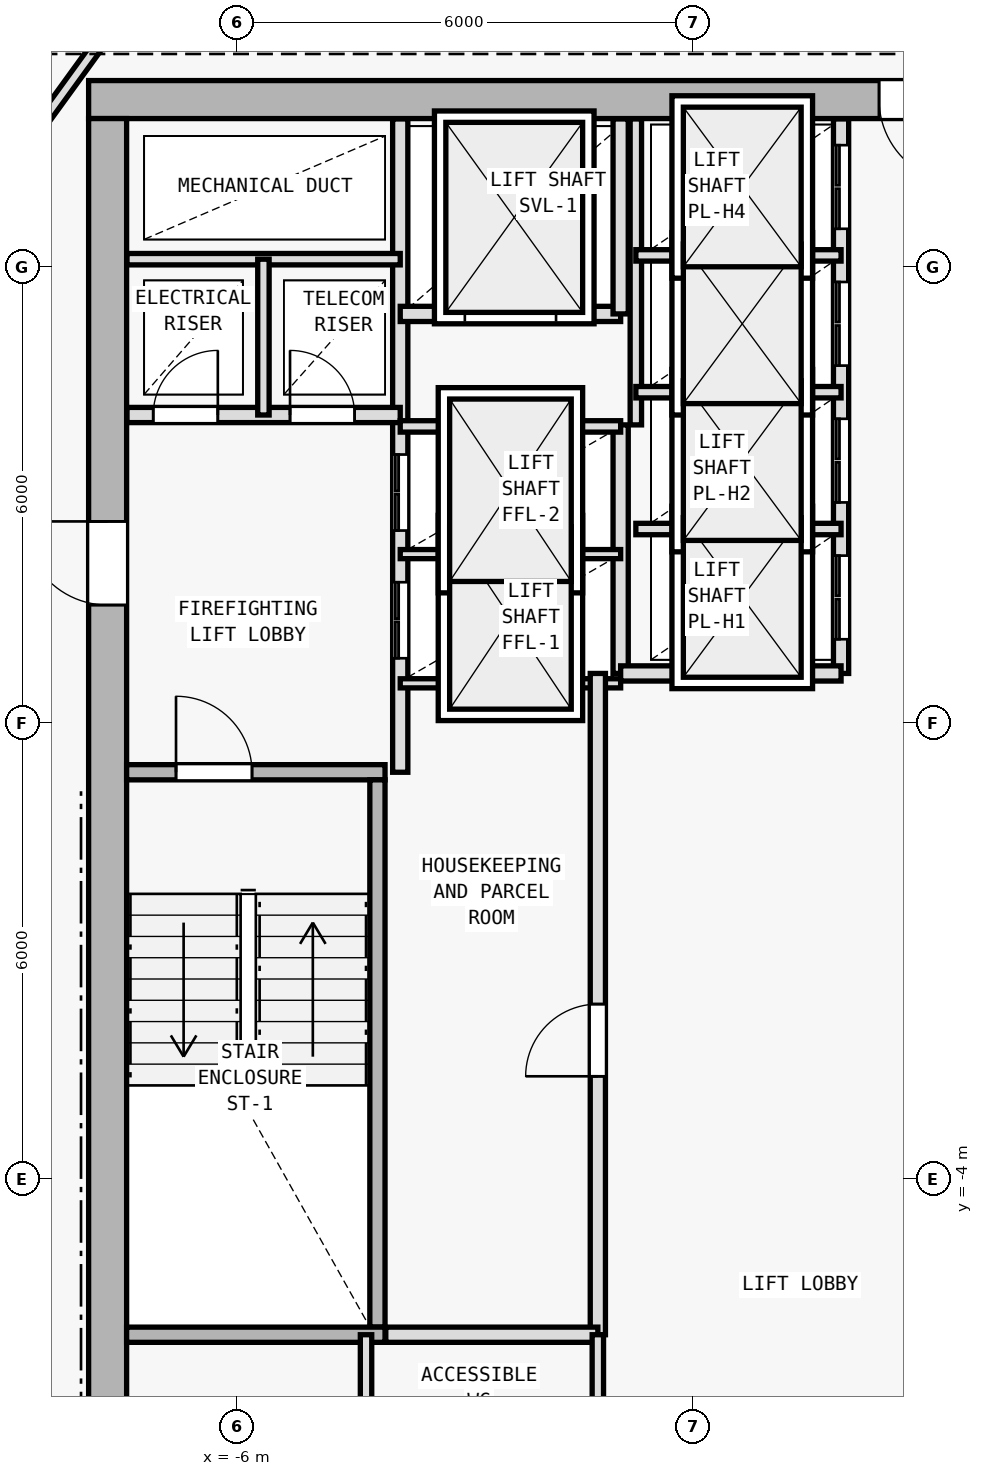
"""IFC4 building model, lengths in metres.
Left out: names, types, materials, properties, quantities, classifications, styles, units other than length and angle.
Written with IfcOpenShell. Run it as: python <this file> out.ifc"""

import sys

from ifc_helpers import new_model, si_unit, direction, frame, frame_2d, origin, origin_2d, place, context, subcontext, project, spatial, rectangle, i_section, extrude, element, fill, save


model = new_model("IFC4")
c1 = context("Model", 3, precision=1e-05, world=origin(), true_north=direction((0.0, 1.0)))
c2 = subcontext(c1, "Body", "Model", "MODEL_VIEW")
j1 = project(units=[si_unit("LENGTHUNIT", "METRE"), si_unit("PLANEANGLEUNIT", "RADIAN")], contexts=[c1])
p1 = place(None, origin())
s1 = spatial("IfcSite", under=j1, at=p1, CompositionType="ELEMENT")
p2 = place(p1, origin())
s2 = spatial("IfcBuilding", under=s1, at=p2, CompositionType="ELEMENT")
p3 = place(p2, frame((0.0, 0.0, 227.1)))
s3 = spatial("IfcBuildingStorey", under=s2, at=p3, CompositionType="ELEMENT", Elevation=227.1)
for number, where, z_axis, x_axis in (
    (1, (-7.7, 10.2, 0.0), (0.0, 0.0, 1.0), (1.0, 0.0, 0.0)),
    (2, (-7.7, 2.0, 0.0), (0.0, 0.0, 1.0), (1.0, 0.0, 0.0)),
):
    element("IfcColumn", number, at=place(p3, frame(where, z_axis=z_axis, x_axis=x_axis)), inside=s3, PredefinedType="COLUMN", context=c2, shape_type="SweptSolid", body=[
        extrude(i_section(OverallWidth=0.398, OverallDepth=0.387, WebThickness=0.013, FlangeThickness=0.022, FilletRadius=0.015, at=origin_2d()), origin(), (0.0, 0.0, 1.0), 3.6),
    ])
p4 = place(p3, frame((7.95, 10.2, 0.0), z_axis=(0.0, 0.0, 1.0), x_axis=(-1.0, 0.0, 0.0)))
e3 = element("IfcWall", 3, at=p4, inside=s3, PredefinedType="SHEAR", context=c2, shape_type="SweptSolid", body=[
    extrude(rectangle(XDim=15.9, YDim=0.5, at=frame_2d((7.95, 0.0))), origin(), (0.0, 0.0, 1.0), 3.35),
])
p5 = place(p4, frame((4.4, 0.0, 0.0)))
e4 = element("IfcOpeningElement", 4, at=p5, cuts=e3, PredefinedType="OPENING", context=c2, shape_type="SweptSolid", body=[
    extrude(rectangle(XDim=1.1, YDim=2.15, at=frame_2d((0.55, 1.075))), frame((0.0, 0.26, 0.0), z_axis=(0.0, -1.0, 0.0), x_axis=(1.0, 0.0, 0.0)), (0.0, 0.0, 1.0), 0.52),
])
p6 = place(p3, frame((-7.7, -9.15, 0.0), z_axis=(0.0, 0.0, 1.0), x_axis=(0.0, 1.0, 0.0)))
e5 = element("IfcWall", 5, at=p6, inside=s3, PredefinedType="SHEAR", context=c2, shape_type="SweptSolid", body=[
    extrude(rectangle(XDim=19.1, YDim=0.5, at=frame_2d((9.55, 0.0))), origin(), (0.0, 0.0, 1.0), 3.35),
])
p7 = place(p6, frame((12.7, 0.0, 0.0)))
e6 = element("IfcOpeningElement", 6, at=p7, cuts=e5, PredefinedType="OPENING", context=c2, shape_type="SweptSolid", body=[
    extrude(rectangle(XDim=1.1, YDim=2.15, at=frame_2d((0.55, 1.075))), frame((0.0, 0.26, 0.0), z_axis=(0.0, -1.0, 0.0), x_axis=(1.0, 0.0, 0.0)), (0.0, 0.0, 1.0), 0.52),
])
p8 = place(p3, frame((-7.45, 1.35, 0.0), z_axis=(0.0, 0.0, 1.0), x_axis=(1.0, 0.0, 0.0)))
e7 = element("IfcWall", 7, at=p8, inside=s3, PredefinedType="SOLIDWALL", context=c2, shape_type="SweptSolid", body=[
    extrude(rectangle(XDim=3.4, YDim=0.2, at=frame_2d((1.7, 0.0))), origin(), (0.0, 0.0, 1.0), 3.35),
])
p9 = place(p8, frame((0.65, 0.0, 0.0)))
e8 = element("IfcOpeningElement", 8, at=p9, cuts=e7, PredefinedType="OPENING", context=c2, shape_type="SweptSolid", body=[
    extrude(rectangle(XDim=1.0, YDim=2.15, at=frame_2d((0.5, 1.075))), frame((0.0, 0.11, 0.0), z_axis=(0.0, -1.0, 0.0), x_axis=(1.0, 0.0, 0.0)), (0.0, 0.0, 1.0), 0.22),
])
p10 = place(p3, frame((-4.15, -5.95, 0.0), z_axis=(0.0, 0.0, 1.0), x_axis=(0.0, 1.0, 0.0)))
e9 = element("IfcWall", 9, at=p10, inside=s3, PredefinedType="SOLIDWALL", context=c2, shape_type="SweptSolid", body=[
    extrude(rectangle(XDim=7.2, YDim=0.2, at=frame_2d((3.6, 0.0))), origin(), (0.0, 0.0, 1.0), 3.35),
])
p11 = place(p3, frame((-3.85, 1.35, 0.0), z_axis=(0.0, 0.0, 1.0), x_axis=(0.0, 1.0, 0.0)))
e10 = element("IfcWall", 10, at=p11, inside=s3, PredefinedType="SOLIDWALL", context=c2, shape_type="SweptSolid", body=[
    extrude(rectangle(XDim=8.595, YDim=0.2, at=frame_2d((4.297, 0.0))), origin(), (0.0, 0.0, 1.0), 3.35),
])
p12 = place(p11, frame((1.5, 0.0, 0.0)))
e11 = element("IfcOpeningElement", 11, at=p12, cuts=e10, PredefinedType="OPENING", context=c2, shape_type="SweptSolid", body=[
    extrude(rectangle(XDim=1.0, YDim=2.15, at=frame_2d((0.5, 1.075))), frame((0.0, 0.11, 0.0), z_axis=(0.0, -1.0, 0.0), x_axis=(1.0, 0.0, 0.0)), (0.0, 0.0, 1.0), 0.22),
])
p13 = place(p11, frame((3.18, 0.0, 0.0)))
e12 = element("IfcOpeningElement", 12, at=p13, cuts=e10, PredefinedType="OPENING", context=c2, shape_type="SweptSolid", body=[
    extrude(rectangle(XDim=1.0, YDim=2.15, at=frame_2d((0.5, 1.075))), frame((0.0, 0.11, 0.0), z_axis=(0.0, -1.0, 0.0), x_axis=(1.0, 0.0, 0.0)), (0.0, 0.0, 1.0), 0.22),
])
p14 = place(p3, frame((-7.445, 6.05, 0.0), z_axis=(0.0, 0.0, 1.0), x_axis=(1.0, 0.0, 0.0)))
e13 = element("IfcWall", 13, at=p14, inside=s3, PredefinedType="SOLIDWALL", context=c2, shape_type="SweptSolid", body=[
    extrude(rectangle(XDim=3.595, YDim=0.2, at=frame_2d((1.797, 0.0))), origin(), (0.0, 0.0, 1.0), 3.35),
])
p15 = place(p14, frame((0.345, 0.0, 0.0)))
e14 = element("IfcOpeningElement", 14, at=p15, cuts=e13, PredefinedType="OPENING", context=c2, shape_type="SweptSolid", body=[
    extrude(rectangle(XDim=0.85, YDim=2.1, at=frame_2d((0.425, 1.05))), frame((0.0, 0.11, 0.0), z_axis=(0.0, -1.0, 0.0), x_axis=(1.0, 0.0, 0.0)), (0.0, 0.0, 1.0), 0.22),
])
p16 = place(p14, frame((2.145, 0.0, 0.0)))
e15 = element("IfcOpeningElement", 15, at=p16, cuts=e13, PredefinedType="OPENING", context=c2, shape_type="SweptSolid", body=[
    extrude(rectangle(XDim=0.85, YDim=2.1, at=frame_2d((0.425, 1.05))), frame((0.0, 0.11, 0.0), z_axis=(0.0, -1.0, 0.0), x_axis=(1.0, 0.0, 0.0)), (0.0, 0.0, 1.0), 0.22),
])
p17 = place(p3, frame((-7.445, 8.1, 0.0), z_axis=(0.0, 0.0, 1.0), x_axis=(1.0, 0.0, 0.0)))
e16 = element("IfcWall", 16, at=p17, inside=s3, PredefinedType="PARTITIONING", context=c2, shape_type="SweptSolid", body=[
    extrude(rectangle(XDim=3.595, YDim=0.15, at=frame_2d((1.797, 0.0))), origin(), (0.0, 0.0, 1.0), 3.35),
])
p18 = place(p3, frame((-5.65, 6.05, 0.0), z_axis=(0.0, 0.0, 1.0), x_axis=(0.0, 1.0, 0.0)))
e17 = element("IfcWall", 17, at=p18, inside=s3, PredefinedType="PARTITIONING", context=c2, shape_type="SweptSolid", body=[
    extrude(rectangle(XDim=2.05, YDim=0.15, at=frame_2d((1.025, 0.0))), origin(), (0.0, 0.0, 1.0), 3.35),
])
p19 = place(p3, frame((-0.95, 2.65, 0.0), z_axis=(0.0, 0.0, 1.0), x_axis=(0.0, 1.0, 0.0)))
e18 = element("IfcWall", 18, at=p19, inside=s3, PredefinedType="SOLIDWALL", context=c2, shape_type="SweptSolid", body=[
    extrude(rectangle(XDim=3.27, YDim=0.2, at=frame_2d((1.635, 0.0))), origin(), (0.0, 0.0, 1.0), 3.35),
])
for number, where, z_axis, x_axis in (
    (19, (-3.85, 2.52, 0.0), (0.0, 0.0, 1.0), (1.0, 0.0, 0.0)),
    (20, (-3.85, 4.22, 0.0), (0.0, 0.0, 1.0), (1.0, 0.0, 0.0)),
):
    element("IfcWall", number, at=place(p3, frame(where, z_axis=z_axis, x_axis=x_axis)), inside=s3, PredefinedType="PARTITIONING", context=c2, shape_type="SweptSolid", body=[
        extrude(rectangle(XDim=2.9, YDim=0.12, at=frame_2d((1.45, 0.0))), origin(), (0.0, 0.0, 1.0), 3.35),
    ])
p20 = place(p3, frame((-3.85, 5.9, 0.0), z_axis=(0.0, 0.0, 1.0), x_axis=(1.0, 0.0, 0.0)))
e21 = element("IfcWall", 21, at=p20, inside=s3, PredefinedType="PARTITIONING", context=c2, shape_type="SweptSolid", body=[
    extrude(rectangle(XDim=2.9, YDim=0.15, at=frame_2d((1.45, 0.0))), origin(), (0.0, 0.0, 1.0), 3.35),
])
p21 = place(p3, frame((-3.85, 7.38, 0.0), z_axis=(0.0, 0.0, 1.0), x_axis=(1.0, 0.0, 0.0)))
e22 = element("IfcWall", 22, at=p21, inside=s3, PredefinedType="SOLIDWALL", context=c2, shape_type="SweptSolid", body=[
    extrude(rectangle(XDim=2.9, YDim=0.2, at=frame_2d((1.45, 0.0))), origin(), (0.0, 0.0, 1.0), 3.35),
])
p22 = place(p21, frame((0.85, 0.0, 0.0)))
e23 = element("IfcOpeningElement", 23, at=p22, cuts=e22, PredefinedType="OPENING", context=c2, shape_type="SweptSolid", body=[
    extrude(rectangle(XDim=1.2, YDim=2.2, at=frame_2d((0.6, 1.1))), frame((0.0, 0.11, 0.0), z_axis=(0.0, -1.0, 0.0), x_axis=(1.0, 0.0, 0.0)), (0.0, 0.0, 1.0), 0.22),
])
p23 = place(p3, frame((-0.95, 7.38, 0.0), z_axis=(0.0, 0.0, 1.0), x_axis=(0.0, 1.0, 0.0)))
e24 = element("IfcWall", 24, at=p23, inside=s3, PredefinedType="SOLIDWALL", context=c2, shape_type="SweptSolid", body=[
    extrude(rectangle(XDim=2.565, YDim=0.2, at=frame_2d((1.283, 0.0))), origin(), (0.0, 0.0, 1.0), 3.35),
])
p24 = place(p3, frame((-1.25, -6.05, 0.0), z_axis=(0.0, 0.0, 1.0), x_axis=(0.0, 1.0, 0.0)))
e25 = element("IfcWall", 25, at=p24, inside=s3, PredefinedType="SOLIDWALL", context=c2, shape_type="SweptSolid", body=[
    extrude(rectangle(XDim=8.7, YDim=0.2, at=frame_2d((4.35, 0.0))), origin(), (0.0, 0.0, 1.0), 3.35),
])
p25 = place(p24, frame((3.4, 0.0, 0.0)))
e26 = element("IfcOpeningElement", 26, at=p25, cuts=e25, PredefinedType="OPENING", context=c2, shape_type="SweptSolid", body=[
    extrude(rectangle(XDim=0.95, YDim=2.1, at=frame_2d((0.475, 1.05))), frame((0.0, 0.11, 0.0), z_axis=(0.0, -1.0, 0.0), x_axis=(1.0, 0.0, 0.0)), (0.0, 0.0, 1.0), 0.22),
])
p26 = place(p3, frame((1.95, 2.65, 0.0), z_axis=(0.0, 0.0, 1.0), x_axis=(0.0, 1.0, 0.0)))
e27 = element("IfcWall", 27, at=p26, inside=s3, PredefinedType="SOLIDWALL", context=c2, shape_type="SweptSolid", body=[
    extrude(rectangle(XDim=7.295, YDim=0.2, at=frame_2d((3.647, 0.0))), origin(), (0.0, 0.0, 1.0), 3.35),
])
p27 = place(p26, frame((0.45, 0.0, 0.0)))
e28 = element("IfcOpeningElement", 28, at=p27, cuts=e27, PredefinedType="OPENING", context=c2, shape_type="SweptSolid", body=[
    extrude(rectangle(XDim=1.1, YDim=2.15, at=frame_2d((0.55, 1.075))), frame((0.0, 0.11, 0.0), z_axis=(0.0, -1.0, 0.0), x_axis=(1.0, 0.0, 0.0)), (0.0, 0.0, 1.0), 0.22),
])
p28 = place(p26, frame((2.25, 0.0, 0.0)))
e29 = element("IfcOpeningElement", 29, at=p28, cuts=e27, PredefinedType="OPENING", context=c2, shape_type="SweptSolid", body=[
    extrude(rectangle(XDim=1.1, YDim=2.15, at=frame_2d((0.55, 1.075))), frame((0.0, 0.11, 0.0), z_axis=(0.0, -1.0, 0.0), x_axis=(1.0, 0.0, 0.0)), (0.0, 0.0, 1.0), 0.22),
])
p29 = place(p26, frame((4.05, 0.0, 0.0)))
e30 = element("IfcOpeningElement", 30, at=p29, cuts=e27, PredefinedType="OPENING", context=c2, shape_type="SweptSolid", body=[
    extrude(rectangle(XDim=1.1, YDim=2.15, at=frame_2d((0.55, 1.075))), frame((0.0, 0.11, 0.0), z_axis=(0.0, -1.0, 0.0), x_axis=(1.0, 0.0, 0.0)), (0.0, 0.0, 1.0), 0.22),
])
p30 = place(p26, frame((5.85, 0.0, 0.0)))
e31 = element("IfcOpeningElement", 31, at=p30, cuts=e27, PredefinedType="OPENING", context=c2, shape_type="SweptSolid", body=[
    extrude(rectangle(XDim=1.1, YDim=2.15, at=frame_2d((0.55, 1.075))), frame((0.0, 0.11, 0.0), z_axis=(0.0, -1.0, 0.0), x_axis=(1.0, 0.0, 0.0)), (0.0, 0.0, 1.0), 0.22),
])
p31 = place(p3, frame((-0.95, 2.65, 0.0), z_axis=(0.0, 0.0, 1.0), x_axis=(1.0, 0.0, 0.0)))
e32 = element("IfcWall", 32, at=p31, inside=s3, PredefinedType="SOLIDWALL", context=c2, shape_type="SweptSolid", body=[
    extrude(rectangle(XDim=2.9, YDim=0.2, at=frame_2d((1.45, 0.0))), origin(), (0.0, 0.0, 1.0), 3.35),
])
p32 = place(p3, frame((-0.75, 5.92, 0.0), z_axis=(0.0, 0.0, 1.0), x_axis=(0.0, 1.0, 0.0)))
e33 = element("IfcWall", 33, at=p32, inside=s3, PredefinedType="PARTITIONING", context=c2, shape_type="SweptSolid", body=[
    extrude(rectangle(XDim=4.025, YDim=0.15, at=frame_2d((2.013, 0.0))), origin(), (0.0, 0.0, 1.0), 3.35),
])
for number, where, z_axis, x_axis in (
    (34, (-0.75, 4.55, 0.0), (0.0, 0.0, 1.0), (1.0, 0.0, 0.0)),
    (35, (-0.75, 6.35, 0.0), (0.0, 0.0, 1.0), (1.0, 0.0, 0.0)),
    (36, (-0.75, 8.15, 0.0), (0.0, 0.0, 1.0), (1.0, 0.0, 0.0)),
):
    element("IfcWall", number, at=place(p3, frame(where, z_axis=z_axis, x_axis=x_axis)), inside=s3, PredefinedType="PARTITIONING", context=c2, shape_type="SweptSolid", body=[
        extrude(rectangle(XDim=2.7, YDim=0.15, at=frame_2d((1.35, 0.0))), origin(), (0.0, 0.0, 1.0), 3.35),
    ])
p33 = place(p3, frame((-7.45, -6.05, 0.0), z_axis=(0.0, 0.0, 1.0), x_axis=(1.0, 0.0, 0.0)))
e37 = element("IfcWall", 37, at=p33, inside=s3, PredefinedType="SOLIDWALL", context=c2, shape_type="SweptSolid", body=[
    extrude(rectangle(XDim=3.4, YDim=0.2, at=frame_2d((1.7, 0.0))), origin(), (0.0, 0.0, 1.0), 3.35),
])
p34 = place(p3, frame((-4.04, -6.05, 0.0), z_axis=(0.0, 0.0, 1.0), x_axis=(1.0, 0.0, 0.0)))
e38 = element("IfcWall", 38, at=p34, inside=s3, PredefinedType="SOLIDWALL", context=c2, shape_type="SweptSolid", body=[
    extrude(rectangle(XDim=2.79, YDim=0.2, at=frame_2d((1.395, 0.0))), origin(), (0.0, 0.0, 1.0), 3.35),
])
p35 = place(p3, frame((-1.25, -9.145, 0.0), z_axis=(0.0, 0.0, 1.0), x_axis=(0.0, 1.0, 0.0)))
e39 = element("IfcWall", 39, at=p35, inside=s3, PredefinedType="PARTITIONING", context=c2, shape_type="SweptSolid", body=[
    extrude(rectangle(XDim=3.095, YDim=0.15, at=frame_2d((1.547, 0.0))), origin(), (0.0, 0.0, 1.0), 3.35),
])
p36 = place(p35, frame((0.845, 0.0, 0.0)))
e40 = element("IfcOpeningElement", 40, at=p36, cuts=e39, PredefinedType="OPENING", context=c2, shape_type="SweptSolid", body=[
    extrude(rectangle(XDim=0.95, YDim=2.1, at=frame_2d((0.475, 1.05))), frame((0.0, 0.085, 0.0), z_axis=(0.0, -1.0, 0.0), x_axis=(1.0, 0.0, 0.0)), (0.0, 0.0, 1.0), 0.17),
])
p37 = place(p3, frame((-4.3, -9.145, 0.0), z_axis=(0.0, 0.0, 1.0), x_axis=(0.0, 1.0, 0.0)))
e41 = element("IfcWall", 41, at=p37, inside=s3, PredefinedType="PARTITIONING", context=c2, shape_type="SweptSolid", body=[
    extrude(rectangle(XDim=3.095, YDim=0.15, at=frame_2d((1.547, 0.0))), origin(), (0.0, 0.0, 1.0), 3.35),
])
p38 = place(p37, frame((0.845, 0.0, 0.0)))
e42 = element("IfcOpeningElement", 42, at=p38, cuts=e41, PredefinedType="OPENING", context=c2, shape_type="SweptSolid", body=[
    extrude(rectangle(XDim=0.9, YDim=2.1, at=frame_2d((0.45, 1.05))), frame((0.0, 0.085, 0.0), z_axis=(0.0, -1.0, 0.0), x_axis=(1.0, 0.0, 0.0)), (0.0, 0.0, 1.0), 0.17),
])
p39 = place(p3, frame((-9.78, 8.226, 0.0), z_axis=(0.0, 0.0, 1.0), x_axis=(0.586956386413, 0.809618552436, 0.0)))
e43 = element("IfcWall", 43, at=p39, inside=s3, PredefinedType="PARTITIONING", context=c2, shape_type="SweptSolid", body=[
    extrude(rectangle(XDim=5.008, YDim=0.15, at=frame_2d((2.504, 0.0))), origin(), (0.0, 0.0, 1.0), 2.975),
])
p40 = place(p7, origin())
e44 = element("IfcDoor", 44, at=p40, inside=s3, OperationType="SINGLE_SWING_RIGHT", PredefinedType="DOOR", context=c2, shape_type="SweptSolid", body=[
    extrude(rectangle(XDim=1.1, YDim=2.15, at=frame_2d((0.55, 1.075))), frame((0.0, 0.025, 0.0), z_axis=(0.0, -1.0, 0.0), x_axis=(1.0, 0.0, 0.0)), (0.0, 0.0, 1.0), 0.05),
])
fill(e6, e44)
p41 = place(p5, origin())
e45 = element("IfcDoor", 45, at=p41, inside=s3, OperationType="SINGLE_SWING_LEFT", PredefinedType="DOOR", context=c2, shape_type="SweptSolid", body=[
    extrude(rectangle(XDim=1.1, YDim=2.15, at=frame_2d((0.55, 1.075))), frame((0.0, 0.025, 0.0), z_axis=(0.0, -1.0, 0.0), x_axis=(1.0, 0.0, 0.0)), (0.0, 0.0, 1.0), 0.05),
])
fill(e4, e45)
p42 = place(p9, origin())
e46 = element("IfcDoor", 46, at=p42, inside=s3, OperationType="SINGLE_SWING_LEFT", PredefinedType="DOOR", context=c2, shape_type="SweptSolid", body=[
    extrude(rectangle(XDim=1.0, YDim=2.15, at=frame_2d((0.5, 1.075))), frame((0.0, 0.025, 0.0), z_axis=(0.0, -1.0, 0.0), x_axis=(1.0, 0.0, 0.0)), (0.0, 0.0, 1.0), 0.05),
])
fill(e8, e46)
p43 = place(p15, origin())
e47 = element("IfcDoor", 47, at=p43, inside=s3, OperationType="SINGLE_SWING_RIGHT", PredefinedType="DOOR", context=c2, shape_type="SweptSolid", body=[
    extrude(rectangle(XDim=0.85, YDim=2.1, at=frame_2d((0.425, 1.05))), frame((0.0, 0.025, 0.0), z_axis=(0.0, -1.0, 0.0), x_axis=(1.0, 0.0, 0.0)), (0.0, 0.0, 1.0), 0.05),
])
fill(e14, e47)
p44 = place(p16, origin())
e48 = element("IfcDoor", 48, at=p44, inside=s3, OperationType="SINGLE_SWING_LEFT", PredefinedType="DOOR", context=c2, shape_type="SweptSolid", body=[
    extrude(rectangle(XDim=0.85, YDim=2.1, at=frame_2d((0.425, 1.05))), frame((0.0, 0.025, 0.0), z_axis=(0.0, -1.0, 0.0), x_axis=(1.0, 0.0, 0.0)), (0.0, 0.0, 1.0), 0.05),
])
fill(e15, e48)
p45 = place(p22, origin())
e49 = element("IfcDoor", 49, at=p45, inside=s3, OperationType="DOUBLE_DOOR_SLIDING", PredefinedType="DOOR", context=c2, shape_type="SweptSolid", body=[
    extrude(rectangle(XDim=1.2, YDim=2.2, at=frame_2d((0.6, 1.1))), frame((0.0, 0.025, 0.0), z_axis=(0.0, -1.0, 0.0), x_axis=(1.0, 0.0, 0.0)), (0.0, 0.0, 1.0), 0.05),
])
fill(e23, e49)
p46 = place(p25, origin())
e50 = element("IfcDoor", 50, at=p46, inside=s3, OperationType="SINGLE_SWING_LEFT", PredefinedType="DOOR", context=c2, shape_type="SweptSolid", body=[
    extrude(rectangle(XDim=0.95, YDim=2.1, at=frame_2d((0.475, 1.05))), frame((0.0, 0.025, 0.0), z_axis=(0.0, -1.0, 0.0), x_axis=(1.0, 0.0, 0.0)), (0.0, 0.0, 1.0), 0.05),
])
fill(e26, e50)
p47 = place(p27, origin())
e51 = element("IfcDoor", 51, at=p47, inside=s3, OperationType="DOUBLE_DOOR_SLIDING", PredefinedType="DOOR", context=c2, shape_type="SweptSolid", body=[
    extrude(rectangle(XDim=1.1, YDim=2.15, at=frame_2d((0.55, 1.075))), frame((0.0, 0.025, 0.0), z_axis=(0.0, -1.0, 0.0), x_axis=(1.0, 0.0, 0.0)), (0.0, 0.0, 1.0), 0.05),
])
fill(e28, e51)
p48 = place(p28, origin())
e52 = element("IfcDoor", 52, at=p48, inside=s3, OperationType="DOUBLE_DOOR_SLIDING", PredefinedType="DOOR", context=c2, shape_type="SweptSolid", body=[
    extrude(rectangle(XDim=1.1, YDim=2.15, at=frame_2d((0.55, 1.075))), frame((0.0, 0.025, 0.0), z_axis=(0.0, -1.0, 0.0), x_axis=(1.0, 0.0, 0.0)), (0.0, 0.0, 1.0), 0.05),
])
fill(e29, e52)
p49 = place(p29, origin())
e53 = element("IfcDoor", 53, at=p49, inside=s3, OperationType="DOUBLE_DOOR_SLIDING", PredefinedType="DOOR", context=c2, shape_type="SweptSolid", body=[
    extrude(rectangle(XDim=1.1, YDim=2.15, at=frame_2d((0.55, 1.075))), frame((0.0, 0.025, 0.0), z_axis=(0.0, -1.0, 0.0), x_axis=(1.0, 0.0, 0.0)), (0.0, 0.0, 1.0), 0.05),
])
fill(e30, e53)
p50 = place(p30, origin())
e54 = element("IfcDoor", 54, at=p50, inside=s3, OperationType="DOUBLE_DOOR_SLIDING", PredefinedType="DOOR", context=c2, shape_type="SweptSolid", body=[
    extrude(rectangle(XDim=1.1, YDim=2.15, at=frame_2d((0.55, 1.075))), frame((0.0, 0.025, 0.0), z_axis=(0.0, -1.0, 0.0), x_axis=(1.0, 0.0, 0.0)), (0.0, 0.0, 1.0), 0.05),
])
fill(e31, e54)
p51 = place(p12, origin())
e55 = element("IfcDoor", 55, at=p51, inside=s3, OperationType="DOUBLE_DOOR_SLIDING", PredefinedType="DOOR", context=c2, shape_type="SweptSolid", body=[
    extrude(rectangle(XDim=1.0, YDim=2.15, at=frame_2d((0.5, 1.075))), frame((0.0, 0.025, 0.0), z_axis=(0.0, -1.0, 0.0), x_axis=(1.0, 0.0, 0.0)), (0.0, 0.0, 1.0), 0.05),
])
fill(e11, e55)
p52 = place(p13, origin())
e56 = element("IfcDoor", 56, at=p52, inside=s3, OperationType="DOUBLE_DOOR_SLIDING", PredefinedType="DOOR", context=c2, shape_type="SweptSolid", body=[
    extrude(rectangle(XDim=1.0, YDim=2.15, at=frame_2d((0.5, 1.075))), frame((0.0, 0.025, 0.0), z_axis=(0.0, -1.0, 0.0), x_axis=(1.0, 0.0, 0.0)), (0.0, 0.0, 1.0), 0.05),
])
fill(e12, e56)
save(model, sys.argv[1])
